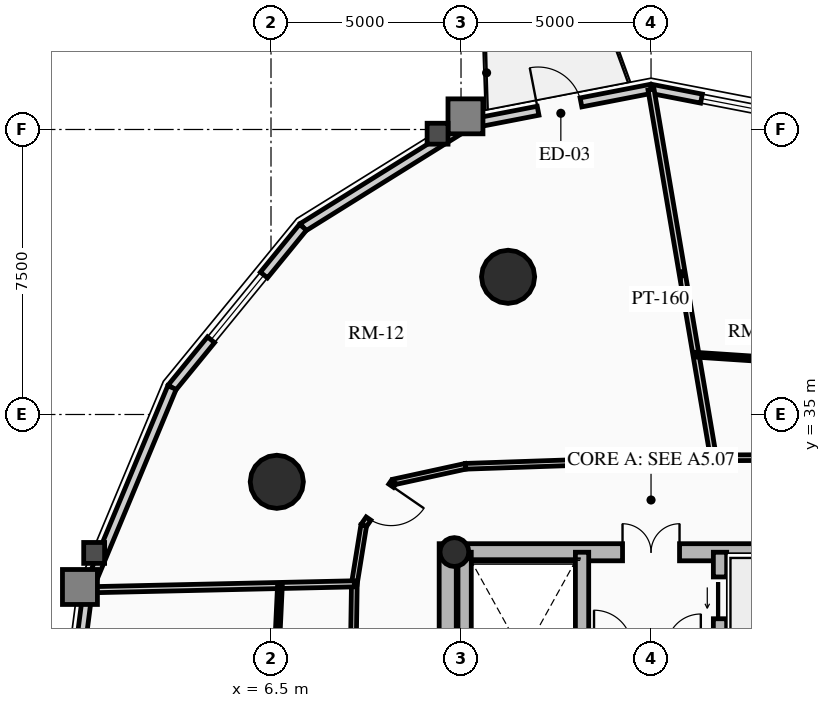
"""IFC4 building model, lengths in metres.
Left out: names, types, materials, properties, quantities, classifications, styles, units other than length and angle.
Written with IfcOpenShell. Run it as: python <this file> out.ifc"""

import sys

from ifc_helpers import new_model, si_unit, direction, frame, frame_2d, origin, origin_2d, place, context, subcontext, project, spatial, rectangle, circle, hollow_circle, extrude, source, transform, mapped, element, fill, save


model = new_model("IFC4")
c1 = context("Model", 3, precision=1e-05, world=origin(), true_north=direction((0.0, 1.0)))
c2 = subcontext(c1, "Body", "Model", "MODEL_VIEW")
j1 = project(units=[si_unit("LENGTHUNIT", "METRE"), si_unit("PLANEANGLEUNIT", "RADIAN")], contexts=[c1])
p1 = place(None, origin())
s1 = spatial("IfcSite", under=j1, at=p1, CompositionType="ELEMENT")
p2 = place(p1, origin())
s2 = spatial("IfcBuilding", under=s1, at=p2, CompositionType="ELEMENT")
p3 = place(p2, frame((0.0, 0.0, 110.89)))
s3 = spatial("IfcBuildingStorey", under=s2, at=p3, CompositionType="ELEMENT", Elevation=110.89)
p4 = place(p3, frame((11.15, 17.4, 0.0), z_axis=(0.0, 0.0, 1.0), x_axis=(0.0, 1.0, 0.0)))
e1 = element("IfcWall", 1, at=p4, inside=s3, PredefinedType="SHEAR", context=c2, shape_type="SweptSolid", body=[
    extrude(rectangle(XDim=14.2, YDim=0.45, at=frame_2d((7.1, 0.0))), origin(), (0.0, 0.0, 1.0), 2.91),
])
p5 = place(p3, frame((11.15, 31.375, 0.0), z_axis=(0.0, 0.0, 1.0), x_axis=(1.0, 0.0, 0.0)))
e2 = element("IfcWall", 2, at=p5, inside=s3, PredefinedType="SHEAR", context=c2, shape_type="SweptSolid", body=[
    extrude(rectangle(XDim=10.7, YDim=0.45, at=frame_2d((5.35, 0.0))), origin(), (0.0, 0.0, 1.0), 2.91),
])
m1 = source(origin(), c2, "Body", "SweptSolid", [
    extrude(rectangle(XDim=1.5, YDim=2.02, at=frame_2d((0.75, 1.01))), frame((0.0, 0.235, 0.0), z_axis=(0.0, -1.0, 0.0), x_axis=(1.0, 0.0, 0.0)), (0.0, 0.0, 1.0), 0.47),
])
p6 = place(p5, frame((4.6, 0.0, 0.0)))
e3 = element("IfcOpeningElement", 3, at=p6, cuts=e2, PredefinedType="OPENING", context=c2, shape_type="MappedRepresentation", body=[
    mapped(m1, transform((0.0, 0.0, 0.0), x_axis=(1.0, 0.0, 0.0), y_axis=(0.0, 1.0, 0.0), z_axis=(0.0, 0.0, 1.0), scale=1.0)),
])
p7 = place(p3, frame((14.685, 17.625, 0.0), z_axis=(0.0, 0.0, 1.0), x_axis=(0.0, 1.0, 0.0)))
e4 = element("IfcWall", 4, at=p7, inside=s3, PredefinedType="SHEAR", context=c2, shape_type="SweptSolid", body=[
    extrude(rectangle(XDim=13.75, YDim=0.35, at=frame_2d((6.875, 0.0))), origin(), (0.0, 0.0, 1.0), 2.91),
])
m2 = source(origin(), c2, "Body", "SweptSolid", [
    extrude(rectangle(XDim=1.1, YDim=2.015, at=frame_2d((0.55, 1.007))), frame((0.0, 0.185, 0.0), z_axis=(0.0, -1.0, 0.0), x_axis=(1.0, 0.0, 0.0)), (0.0, 0.0, 1.0), 0.37),
])
p8 = place(p7, frame((4.875, 0.0, 0.0)))
e5 = element("IfcOpeningElement", 5, at=p8, cuts=e4, PredefinedType="OPENING", context=c2, shape_type="MappedRepresentation", body=[
    mapped(m2, transform((0.0, 0.0, 0.0), x_axis=(1.0, 0.0, 0.0), y_axis=(0.0, 1.0, 0.0), z_axis=(0.0, 0.0, 1.0), scale=1.0)),
])
m3 = source(origin(), c2, "Body", "SweptSolid", [
    extrude(rectangle(XDim=1.15, YDim=2.02, at=frame_2d((0.575, 1.01))), frame((0.0, 0.185, 0.0), z_axis=(0.0, -1.0, 0.0), x_axis=(1.0, 0.0, 0.0)), (0.0, 0.0, 1.0), 0.37),
])
p9 = place(p7, frame((7.295, 0.0, 0.0)))
e6 = element("IfcOpeningElement", 6, at=p9, cuts=e4, PredefinedType="OPENING", context=c2, shape_type="MappedRepresentation", body=[
    mapped(m3, transform((0.0, 0.0, 0.0), x_axis=(1.0, 0.0, 0.0), y_axis=(0.0, 1.0, 0.0), z_axis=(0.0, 0.0, 1.0), scale=1.0)),
])
p10 = place(p3, frame((18.315, 17.625, 0.0), z_axis=(0.0, 0.0, 1.0), x_axis=(0.0, 1.0, 0.0)))
e7 = element("IfcWall", 7, at=p10, inside=s3, PredefinedType="SHEAR", context=c2, shape_type="SweptSolid", body=[
    extrude(rectangle(XDim=13.75, YDim=0.35, at=frame_2d((6.875, 0.0))), origin(), (0.0, 0.0, 1.0), 2.91),
])
p11 = place(p10, frame((10.0, 0.0, 0.0)))
e8 = element("IfcOpeningElement", 8, at=p11, cuts=e7, PredefinedType="OPENING", context=c2, shape_type="MappedRepresentation", body=[
    mapped(m2, transform((0.0, 0.0, 0.0), x_axis=(1.0, 0.0, 0.0), y_axis=(0.0, 1.0, 0.0), z_axis=(0.0, 0.0, 1.0), scale=1.0)),
])
p12 = place(p10, frame((12.0, 0.0, 0.0)))
e9 = element("IfcOpeningElement", 9, at=p12, cuts=e7, PredefinedType="OPENING", context=c2, shape_type="MappedRepresentation", body=[
    mapped(m2, transform((0.0, 0.0, 0.0), x_axis=(1.0, 0.0, 0.0), y_axis=(0.0, 1.0, 0.0), z_axis=(0.0, 0.0, 1.0), scale=1.0)),
])
p13 = place(p10, frame((5.305, 0.0, 0.0)))
e10 = element("IfcOpeningElement", 10, at=p13, cuts=e7, PredefinedType="OPENING", context=c2, shape_type="MappedRepresentation", body=[
    mapped(m3, transform((0.0, 0.0, 0.0), x_axis=(1.0, 0.0, 0.0), y_axis=(0.0, 1.0, 0.0), z_axis=(0.0, 0.0, 1.0), scale=1.0)),
])
p14 = place(p3, frame((11.595, 24.655, 0.0), z_axis=(0.0, 0.0, 1.0), x_axis=(0.0, 1.0, 0.0)))
e11 = element("IfcWall", 11, at=p14, inside=s3, PredefinedType="SHEAR", context=c2, shape_type="SweptSolid", body=[
    extrude(rectangle(XDim=6.72, YDim=0.35, at=frame_2d((3.36, 0.0))), origin(), (0.0, 0.0, 1.0), 2.91),
])
p15 = place(p3, frame((11.325, 31.38, 0.0), z_axis=(0.0, 0.0, 1.0), x_axis=(1.0, 0.0, 0.0)))
e12 = element("IfcColumn", 12, at=p15, inside=s3, PredefinedType="COLUMN", context=c2, shape_type="SweptSolid", body=[
    extrude(hollow_circle(Radius=0.38, WallThickness=0.032, at=origin_2d()), origin(), (0.0, 0.0, 1.0), 2.91),
])
for number, where, z_axis, x_axis in (
    (13, (12.739, 38.623, 0.0), (0.0, 0.0, 1.0), (1.0, 0.0, 0.0)),
    (14, (6.653, 33.229, 0.0), (0.0, 0.0, 1.0), (1.0, 0.0, 0.0)),
):
    element("IfcColumn", number, at=place(p3, frame(where, z_axis=z_axis, x_axis=x_axis)), inside=s3, PredefinedType="USERDEFINED", context=c2, shape_type="SweptSolid", body=[
        extrude(circle(Radius=0.7, at=origin_2d()), origin(), (0.0, 0.0, 1.0), 2.91),
    ])
p16 = place(p3, frame((16.5, 43.57, 0.0), z_axis=(0.0, 0.0, 1.0), x_axis=(0.981723785992, -0.190311344954, 0.0)))
e15 = element("IfcWall", 15, at=p16, inside=s3, PredefinedType="SOLIDWALL", context=c2, shape_type="SweptSolid", body=[
    extrude(rectangle(XDim=4.904, YDim=0.24, at=frame_2d((2.452, 0.0))), origin(), (0.0, 0.0, 1.0), 2.179),
])
m4 = source(origin(), c2, "Body", "SweptSolid", [
    extrude(rectangle(XDim=2.2, YDim=1.35, at=frame_2d((1.1, 0.675))), frame((0.0, 0.13, 0.0), z_axis=(0.0, -1.0, 0.0), x_axis=(1.0, 0.0, 0.0)), (0.0, 0.0, 1.0), 0.26),
])
p17 = place(p16, frame((1.352, 0.0, 0.65)))
e16 = element("IfcOpeningElement", 16, at=p17, cuts=e15, PredefinedType="OPENING", context=c2, shape_type="MappedRepresentation", body=[
    mapped(m4, transform((0.0, 0.0, 0.0), x_axis=(1.0, 0.0, 0.0), y_axis=(0.0, 1.0, 0.0), z_axis=(0.0, 0.0, 1.0), scale=1.0)),
])
p18 = place(p3, frame((11.685, 42.637, 0.0), z_axis=(0.0, 0.0, 1.0), x_axis=(0.981723785992, 0.190311344954, 0.0)))
e17 = element("IfcWall", 17, at=p18, inside=s3, PredefinedType="SOLIDWALL", context=c2, shape_type="SweptSolid", body=[
    extrude(rectangle(XDim=4.904, YDim=0.24, at=frame_2d((2.452, 0.0))), origin(), (0.0, 0.0, 1.0), 2.179),
])
m5 = source(origin(), c2, "Body", "SweptSolid", [
    extrude(rectangle(XDim=1.15, YDim=2.005, at=frame_2d((0.575, 1.002))), frame((0.0, 0.13, 0.0), z_axis=(0.0, -1.0, 0.0), x_axis=(1.0, 0.0, 0.0)), (0.0, 0.0, 1.0), 0.26),
])
p19 = place(p18, frame((1.877, 0.0, 0.0)))
e18 = element("IfcOpeningElement", 18, at=p19, cuts=e17, PredefinedType="OPENING", context=c2, shape_type="MappedRepresentation", body=[
    mapped(m5, transform((0.0, 0.0, 0.0), x_axis=(1.0, 0.0, 0.0), y_axis=(0.0, 1.0, 0.0), z_axis=(0.0, 0.0, 1.0), scale=1.0)),
])
p20 = place(p3, frame((7.342, 39.928, 0.0), z_axis=(0.0, 0.0, 1.0), x_axis=(0.848520380187, 0.529162701263, 0.0)))
e19 = element("IfcWall", 19, at=p20, inside=s3, PredefinedType="SOLIDWALL", context=c2, shape_type="SweptSolid", body=[
    extrude(rectangle(XDim=5.119, YDim=0.24, at=frame_2d((2.56, 0.0))), origin(), (0.0, 0.0, 1.0), 2.179),
])
p21 = place(p3, frame((3.895, 35.709, 0.0), z_axis=(0.0, 0.0, 1.0), x_axis=(0.632700781152, 0.77439635945, 0.0)))
e20 = element("IfcWall", 20, at=p21, inside=s3, PredefinedType="SOLIDWALL", context=c2, shape_type="SweptSolid", body=[
    extrude(rectangle(XDim=5.448, YDim=0.24, at=frame_2d((2.724, 0.0))), origin(), (0.0, 0.0, 1.0), 2.179),
])
p22 = place(p21, frame((1.624, 0.0, 0.65)))
e21 = element("IfcOpeningElement", 21, at=p22, cuts=e20, PredefinedType="OPENING", context=c2, shape_type="MappedRepresentation", body=[
    mapped(m4, transform((0.0, 0.0, 0.0), x_axis=(1.0, 0.0, 0.0), y_axis=(0.0, 1.0, 0.0), z_axis=(0.0, 0.0, 1.0), scale=1.0)),
])
p23 = place(p3, frame((1.682, 30.393, 0.0), z_axis=(0.0, 0.0, 1.0), x_axis=(0.384344417632, 0.923189779317, 0.0)))
e22 = element("IfcWall", 22, at=p23, inside=s3, PredefinedType="SOLIDWALL", context=c2, shape_type="SweptSolid", body=[
    extrude(rectangle(XDim=5.758, YDim=0.24, at=frame_2d((2.879, 0.0))), origin(), (0.0, 0.0, 1.0), 2.179),
])
p24 = place(p3, frame((0.919, 24.5, 0.0), z_axis=(0.0, 0.0, 1.0), x_axis=(0.128351991996, 0.991728675672, 0.0)))
e23 = element("IfcWall", 23, at=p24, inside=s3, PredefinedType="SOLIDWALL", context=c2, shape_type="SweptSolid", body=[
    extrude(rectangle(XDim=5.942, YDim=0.24, at=frame_2d((2.971, 0.0))), origin(), (0.0, 0.0, 1.0), 2.179),
])
m6 = source(origin(), c2, "Body", "SweptSolid", [
    extrude(rectangle(XDim=1.9, YDim=1.35, at=frame_2d((0.95, 0.675))), frame((0.0, 0.13, 0.0), z_axis=(0.0, -1.0, 0.0), x_axis=(1.0, 0.0, 0.0)), (0.0, 0.0, 1.0), 0.26),
])
p25 = place(p24, frame((2.021, 0.0, 0.65)))
e24 = element("IfcOpeningElement", 24, at=p25, cuts=e23, PredefinedType="OPENING", context=c2, shape_type="MappedRepresentation", body=[
    mapped(m6, transform((0.0, 0.0, 0.0), x_axis=(1.0, 0.0, 0.0), y_axis=(0.0, 1.0, 0.0), z_axis=(0.0, 0.0, 1.0), scale=1.0)),
])
p26 = place(p3, frame((21.527, 33.873, 0.0), z_axis=(0.0, 0.0, 1.0), x_axis=(-0.999991838845, -0.004040079574, 0.0)))
e25 = element("IfcWall", 25, at=p26, inside=s3, PredefinedType="PARTITIONING", context=c2, shape_type="SweptSolid", body=[
    extrude(rectangle(XDim=3.384, YDim=0.15, at=frame_2d((1.692, 0.0))), origin(), (0.0, 0.0, 1.0), 2.225),
])
p27 = place(p3, frame((18.143, 33.86, 0.0), z_axis=(0.0, 0.0, 1.0), x_axis=(-0.999419208319, -0.034077060363, 0.0)))
e26 = element("IfcWall", 26, at=p27, inside=s3, PredefinedType="PARTITIONING", context=c2, shape_type="SweptSolid", body=[
    extrude(rectangle(XDim=6.527, YDim=0.15, at=frame_2d((3.263, 0.0))), origin(), (0.0, 0.0, 1.0), 2.225),
])
p28 = place(p3, frame((11.62, 33.637, 0.0), z_axis=(0.0, 0.0, 1.0), x_axis=(-0.97702579435, -0.213121085711, 0.0)))
e27 = element("IfcWall", 27, at=p28, inside=s3, PredefinedType="PARTITIONING", context=c2, shape_type="SweptSolid", body=[
    extrude(rectangle(XDim=1.935, YDim=0.15, at=frame_2d((0.967, 0.0))), origin(), (0.0, 0.0, 1.0), 2.225),
])
p29 = place(p3, frame((9.729, 33.225, 0.0), z_axis=(0.0, 0.0, 1.0), x_axis=(-0.567183649484, -0.82359134755, 0.0)))
e28 = element("IfcWall", 28, at=p29, inside=s3, PredefinedType="PARTITIONING", context=c2, shape_type="SweptSolid", body=[
    extrude(rectangle(XDim=1.392, YDim=0.15, at=frame_2d((0.696, 0.0))), origin(), (0.0, 0.0, 1.0), 2.225),
])
m7 = source(origin(), c2, "Body", "SweptSolid", [
    extrude(rectangle(XDim=1.05, YDim=2.015, at=frame_2d((0.525, 1.007))), frame((0.0, 0.085, 0.0), z_axis=(0.0, -1.0, 0.0), x_axis=(1.0, 0.0, 0.0)), (0.0, 0.0, 1.0), 0.17),
])
p30 = place(p29, frame((0.12, 0.0, 0.0)))
e29 = element("IfcOpeningElement", 29, at=p30, cuts=e28, PredefinedType="OPENING", context=c2, shape_type="MappedRepresentation", body=[
    mapped(m7, transform((0.0, 0.0, 0.0), x_axis=(1.0, 0.0, 0.0), y_axis=(0.0, 1.0, 0.0), z_axis=(0.0, 0.0, 1.0), scale=1.0)),
])
p31 = place(p3, frame((8.94, 32.078, 0.0), z_axis=(0.0, 0.0, 1.0), x_axis=(-0.159148467753, -0.98725466077, 0.0)))
e30 = element("IfcWall", 30, at=p31, inside=s3, PredefinedType="PARTITIONING", context=c2, shape_type="SweptSolid", body=[
    extrude(rectangle(XDim=1.554, YDim=0.15, at=frame_2d((0.777, 0.0))), origin(), (0.0, 0.0, 1.0), 2.225),
])
p32 = place(p3, frame((8.693, 30.544, 0.0), z_axis=(0.0, 0.0, 1.0), x_axis=(-0.015307007986, -0.99988284089, 0.0)))
e31 = element("IfcWall", 31, at=p32, inside=s3, PredefinedType="PARTITIONING", context=c2, shape_type="SweptSolid", body=[
    extrude(rectangle(XDim=6.045, YDim=0.15, at=frame_2d((3.022, 0.0))), origin(), (0.0, 0.0, 1.0), 2.655),
])
p33 = place(p3, frame((18.143, 33.86, 0.0), z_axis=(0.0, 0.0, 1.0), x_axis=(-0.167145472003, 0.985932244725, 0.0)))
e32 = element("IfcWall", 32, at=p33, inside=s3, PredefinedType="PARTITIONING", context=c2, shape_type="SweptSolid", body=[
    extrude(rectangle(XDim=9.829, YDim=0.16, at=frame_2d((4.914, 0.0))), origin(), (0.0, 0.0, 1.0), 2.179),
])
p34 = place(p3, frame((8.693, 30.544, 0.0), z_axis=(0.0, 0.0, 1.0), x_axis=(-0.999746482141, -0.022516026432, 0.0)))
e33 = element("IfcWall", 33, at=p34, inside=s3, PredefinedType="PARTITIONING", context=c2, shape_type="SweptSolid", body=[
    extrude(rectangle(XDim=6.994, YDim=0.16, at=frame_2d((3.497, 0.0))), origin(), (0.0, 0.0, 1.0), 2.179),
])
p35 = place(p3, frame((21.466, 36.322, 0.0), z_axis=(0.0, 0.0, 1.0), x_axis=(-0.997806476515, 0.066198454847, 0.0)))
e34 = element("IfcWall", 34, at=p35, inside=s3, PredefinedType="PARTITIONING", context=c2, shape_type="SweptSolid", body=[
    extrude(rectangle(XDim=3.791, YDim=0.125, at=frame_2d((1.896, 0.0))), origin(), (0.0, 0.0, 1.0), 2.225),
])
p36 = place(p3, frame((6.735, 30.5, 0.0), z_axis=(0.0, 0.0, 1.0), x_axis=(-0.046620801603, -0.998912659274, 0.0)))
e35 = element("IfcWall", 35, at=p36, inside=s3, PredefinedType="PARTITIONING", context=c2, shape_type="SweptSolid", body=[
    extrude(rectangle(XDim=6.007, YDim=0.125, at=frame_2d((3.003, 0.0))), origin(), (0.0, 0.0, 1.0), 2.655),
])
m8 = source(origin(), c2, "Body", "SweptSolid", [
    extrude(rectangle(XDim=2.2, YDim=1.35, at=frame_2d((1.1, 0.675))), frame((0.0, 0.03, 0.0), z_axis=(0.0, -1.0, 0.0), x_axis=(1.0, 0.0, 0.0)), (0.0, 0.0, 1.0), 0.06),
])
p37 = place(p17, origin())
e36 = element("IfcWindow", 36, at=p37, inside=s3, PartitioningType="DOUBLE_PANEL_VERTICAL", PredefinedType="WINDOW", context=c2, shape_type="MappedRepresentation", body=[
    mapped(m8, transform((0.0, 0.0, 0.0), x_axis=(1.0, 0.0, 0.0), y_axis=(0.0, 1.0, 0.0), z_axis=(0.0, 0.0, 1.0), scale=1.0)),
])
fill(e16, e36)
m9 = source(origin(), c2, "Body", "SweptSolid", [
    extrude(rectangle(XDim=1.15, YDim=2.005, at=frame_2d((0.575, 1.002))), frame((0.0, 0.025, 0.0), z_axis=(0.0, -1.0, 0.0), x_axis=(1.0, 0.0, 0.0)), (0.0, 0.0, 1.0), 0.05),
])
p38 = place(p19, origin())
e37 = element("IfcDoor", 37, at=p38, inside=s3, OperationType="SINGLE_SWING_LEFT", PredefinedType="DOOR", context=c2, shape_type="MappedRepresentation", body=[
    mapped(m9, transform((0.0, 0.0, 0.0), x_axis=(1.0, 0.0, 0.0), y_axis=(0.0, 1.0, 0.0), z_axis=(0.0, 0.0, 1.0), scale=1.0)),
])
fill(e18, e37)
p39 = place(p22, origin())
e38 = element("IfcWindow", 38, at=p39, inside=s3, PartitioningType="DOUBLE_PANEL_VERTICAL", PredefinedType="WINDOW", context=c2, shape_type="MappedRepresentation", body=[
    mapped(m8, transform((0.0, 0.0, 0.0), x_axis=(1.0, 0.0, 0.0), y_axis=(0.0, 1.0, 0.0), z_axis=(0.0, 0.0, 1.0), scale=1.0)),
])
fill(e21, e38)
m10 = source(origin(), c2, "Body", "SweptSolid", [
    extrude(rectangle(XDim=1.1, YDim=2.015, at=frame_2d((0.55, 1.007))), frame((0.0, 0.025, 0.0), z_axis=(0.0, -1.0, 0.0), x_axis=(1.0, 0.0, 0.0)), (0.0, 0.0, 1.0), 0.05),
])
p40 = place(p12, origin())
e39 = element("IfcDoor", 39, at=p40, inside=s3, OperationType="SLIDING_TO_LEFT", PredefinedType="DOOR", context=c2, shape_type="MappedRepresentation", body=[
    mapped(m10, transform((0.0, 0.0, 0.0), x_axis=(1.0, 0.0, 0.0), y_axis=(0.0, 1.0, 0.0), z_axis=(0.0, 0.0, 1.0), scale=1.0)),
])
fill(e9, e39)
m11 = source(origin(), c2, "Body", "SweptSolid", [
    extrude(rectangle(XDim=1.5, YDim=2.02, at=frame_2d((0.75, 1.01))), frame((0.0, 0.025, 0.0), z_axis=(0.0, -1.0, 0.0), x_axis=(1.0, 0.0, 0.0)), (0.0, 0.0, 1.0), 0.05),
])
p41 = place(p6, origin())
e40 = element("IfcDoor", 40, at=p41, inside=s3, OperationType="DOUBLE_DOOR_SINGLE_SWING", PredefinedType="DOOR", context=c2, shape_type="MappedRepresentation", body=[
    mapped(m11, transform((0.0, 0.0, 0.0), x_axis=(1.0, 0.0, 0.0), y_axis=(0.0, 1.0, 0.0), z_axis=(0.0, 0.0, 1.0), scale=1.0)),
])
fill(e3, e40)
m12 = source(origin(), c2, "Body", "SweptSolid", [
    extrude(rectangle(XDim=1.05, YDim=2.015, at=frame_2d((0.525, 1.007))), frame((0.0, 0.025, 0.0), z_axis=(0.0, -1.0, 0.0), x_axis=(1.0, 0.0, 0.0)), (0.0, 0.0, 1.0), 0.05),
])
p42 = place(p30, origin())
e41 = element("IfcDoor", 41, at=p42, inside=s3, OperationType="SINGLE_SWING_LEFT", PredefinedType="DOOR", context=c2, shape_type="MappedRepresentation", body=[
    mapped(m12, transform((0.0, 0.0, 0.0), x_axis=(1.0, 0.0, 0.0), y_axis=(0.0, 1.0, 0.0), z_axis=(0.0, 0.0, 1.0), scale=1.0)),
])
fill(e29, e41)
save(model, sys.argv[1])
